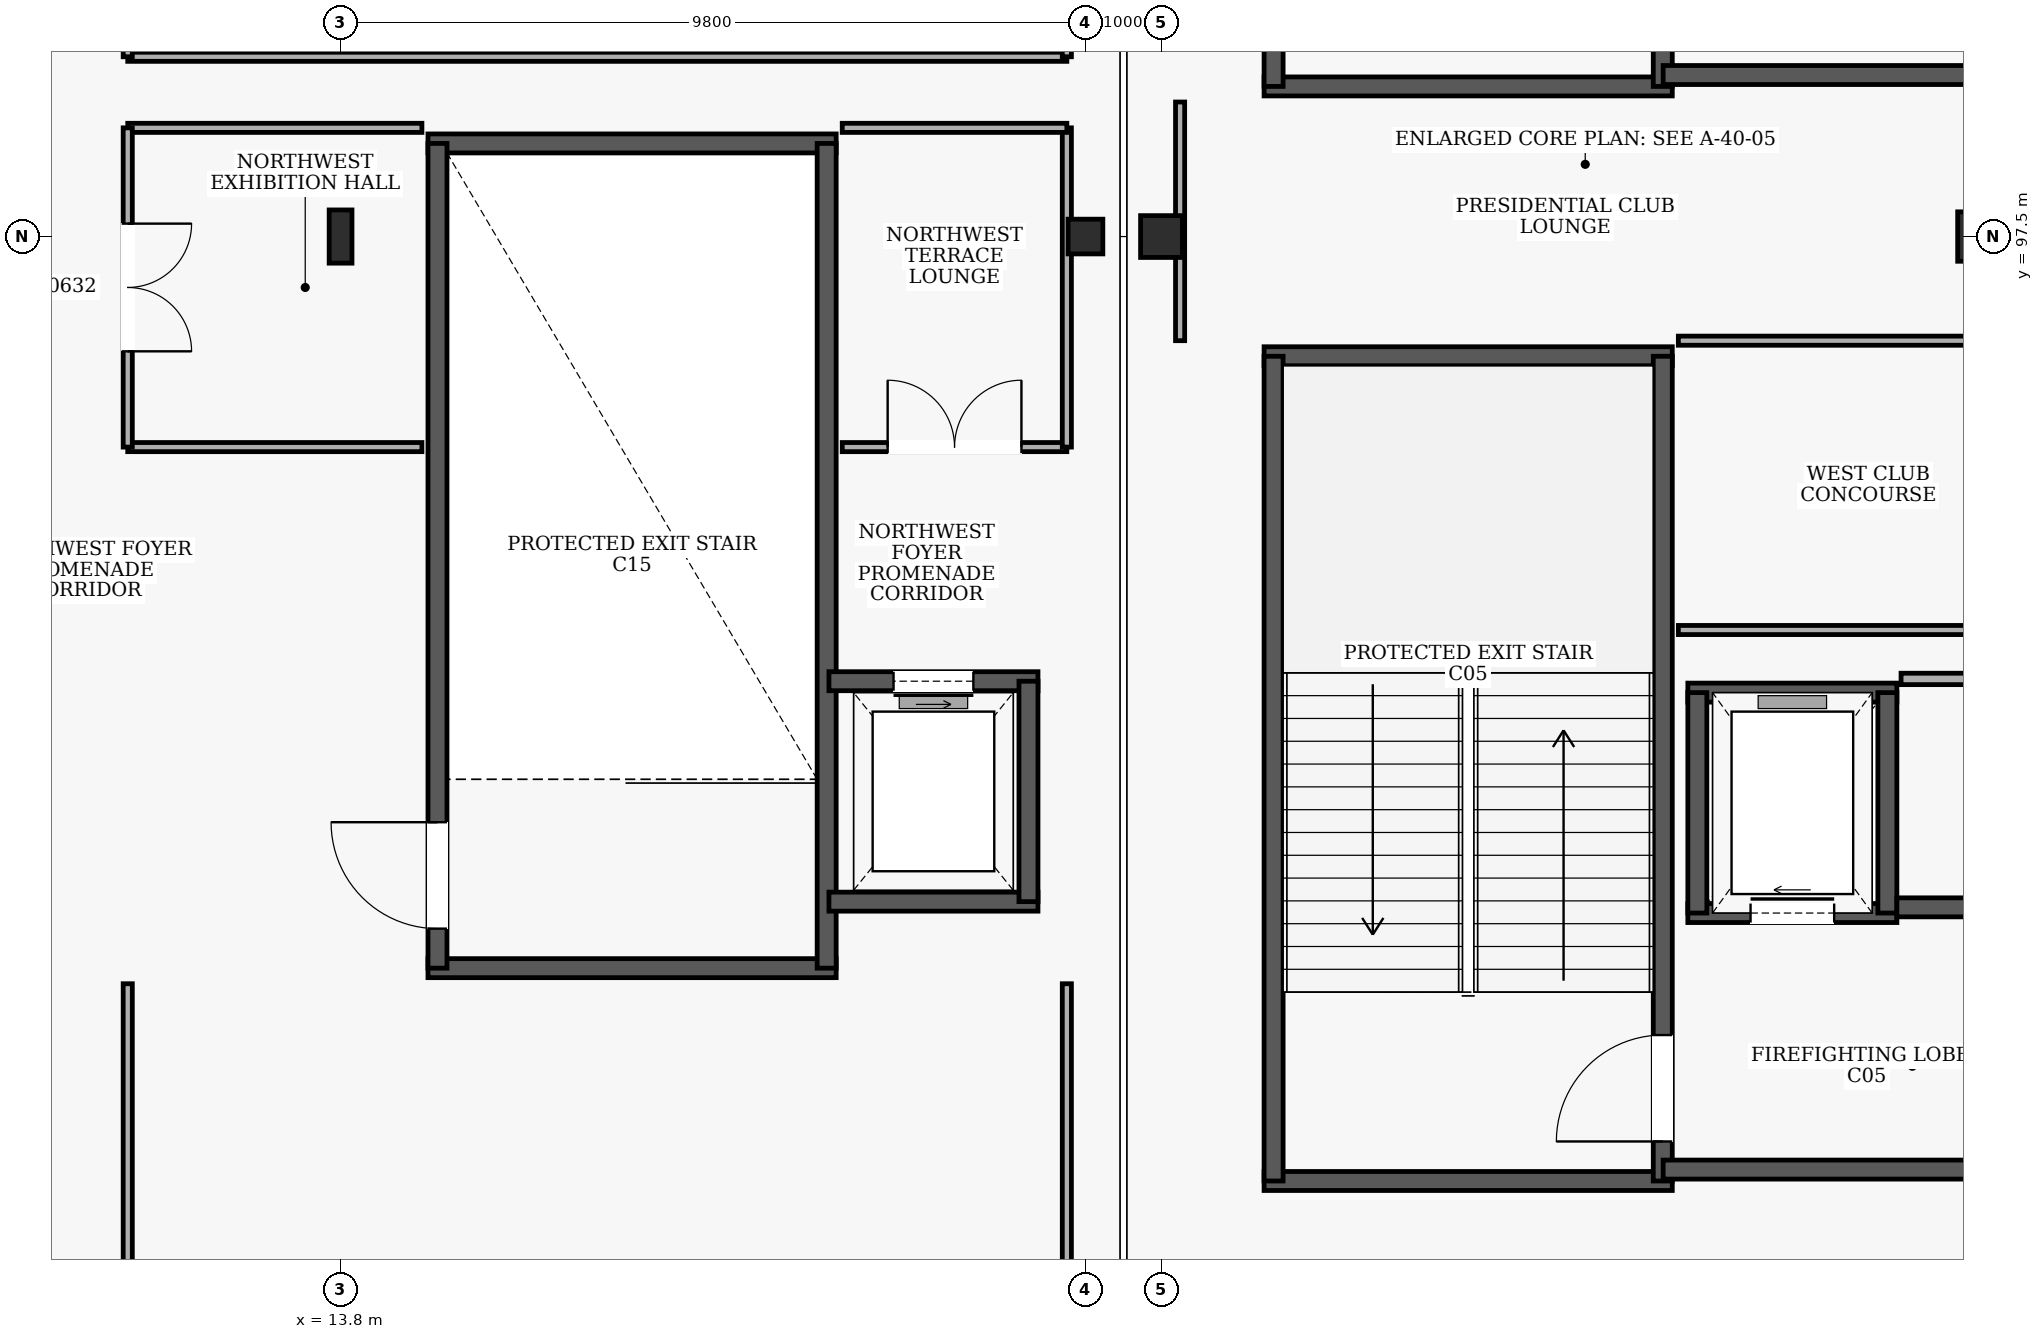
"""IFC4 building model, lengths in metres.
Left out: names, types, materials, properties, quantities, classifications, styles, units other than length and angle.
Written with IfcOpenShell. Run it as: python <this file> out.ifc"""

import sys

from ifc_helpers import new_model, si_unit, direction, frame, frame_2d, origin, origin_2d, place, context, subcontext, project, spatial, rectangle, hollow_circle, i_section, extrude, element, fill, save


model = new_model("IFC4")
c1 = context("Model", 3, precision=1e-05, world=origin(), true_north=direction((0.0, 1.0)))
c2 = subcontext(c1, "Body", "Model", "MODEL_VIEW")
j1 = project(units=[si_unit("LENGTHUNIT", "METRE"), si_unit("PLANEANGLEUNIT", "RADIAN")], contexts=[c1])
p1 = place(None, origin())
s1 = spatial("IfcSite", under=j1, at=p1, CompositionType="ELEMENT")
p2 = place(p1, origin())
s2 = spatial("IfcBuilding", under=s1, at=p2, CompositionType="ELEMENT")
p3 = place(p2, frame((0.0, 0.0, 10.2)))
s3 = spatial("IfcBuildingStorey", under=s2, at=p3, CompositionType="ELEMENT", Elevation=10.2)
p4 = place(p3, frame((13.8, 97.5, 0.0), z_axis=(0.0, 0.0, 1.0), x_axis=(1.0, 0.0, 0.0)))
e1 = element("IfcColumn", 1, at=p4, inside=s3, PredefinedType="COLUMN", context=c2, shape_type="SweptSolid", body=[
    extrude(i_section(OverallWidth=0.3, OverallDepth=0.7, WebThickness=0.017, FlangeThickness=0.032, at=origin_2d()), origin(), (0.0, 0.0, 1.0), 4.8),
])
p5 = place(p3, frame((23.6, 97.5, 0.0), z_axis=(0.0, 0.0, 1.0), x_axis=(1.0, 0.0, 0.0)))
e2 = element("IfcColumn", 2, at=p5, inside=s3, PredefinedType="COLUMN", context=c2, shape_type="SweptSolid", body=[
    extrude(hollow_circle(Radius=0.229, WallThickness=0.02, at=origin_2d()), origin(), (0.0, 0.0, 1.0), 4.8),
])
p6 = place(p3, frame((24.6, 97.5, 0.0), z_axis=(0.0, 0.0, 1.0), x_axis=(1.0, 0.0, 0.0)))
e3 = element("IfcColumn", 3, at=p6, inside=s3, PredefinedType="COLUMN", context=c2, shape_type="SweptSolid", body=[
    extrude(rectangle(XDim=0.55, YDim=0.55, at=origin_2d()), origin(), (0.0, 0.0, 1.0), 4.8),
])
p7 = place(p3, frame((35.4, 97.5, 0.0), z_axis=(0.0, 0.0, 1.0), x_axis=(1.0, 0.0, 0.0)))
e4 = element("IfcColumn", 4, at=p7, inside=s3, PredefinedType="COLUMN", context=c2, shape_type="SweptSolid", body=[
    extrude(rectangle(XDim=0.65, YDim=0.65, at=origin_2d()), origin(), (0.0, 0.0, 1.0), 4.8),
])
for number, where, z_axis, x_axis in (
    (5, (25.95, 85.075, 0.0), (0.0, 0.0, 1.0), (1.0, 0.0, 0.0)),
    (6, (31.32, 95.925, 0.0), (0.0, 0.0, 1.0), (-1.0, 0.0, 0.0)),
):
    element("IfcWall", number, at=place(p3, frame(where, z_axis=z_axis, x_axis=x_axis)), inside=s3, PredefinedType="SHEAR", context=c2, shape_type="SweptSolid", body=[
        extrude(rectangle(XDim=5.37, YDim=0.25, at=frame_2d((2.685, 0.0))), origin(), (0.0, 0.0, 1.0), 4.48),
    ])
p8 = place(p3, frame((26.075, 85.075, 0.0), z_axis=(0.0, 0.0, 1.0), x_axis=(0.0, 1.0, 0.0)))
e7 = element("IfcWall", 7, at=p8, inside=s3, PredefinedType="SHEAR", context=c2, shape_type="SweptSolid", body=[
    extrude(rectangle(XDim=10.85, YDim=0.25, at=frame_2d((5.425, 0.0))), origin(), (0.0, 0.0, 1.0), 4.48),
])
p9 = place(p3, frame((31.195, 85.075, 0.0), z_axis=(0.0, 0.0, 1.0), x_axis=(0.0, 1.0, 0.0)))
e8 = element("IfcWall", 8, at=p9, inside=s3, PredefinedType="SHEAR", context=c2, shape_type="SweptSolid", body=[
    extrude(rectangle(XDim=10.85, YDim=0.25, at=frame_2d((5.425, 0.0))), origin(), (0.0, 0.0, 1.0), 4.48),
])
p10 = place(p9, frame((0.52, 0.0, 0.0)))
e9 = element("IfcOpeningElement", 9, at=p10, cuts=e8, PredefinedType="OPENING", context=c2, shape_type="SweptSolid", body=[
    extrude(rectangle(XDim=1.4, YDim=2.15, at=frame_2d((0.7, 1.075))), frame((0.0, 0.135, 0.0), z_axis=(0.0, -1.0, 0.0), x_axis=(1.0, 0.0, 0.0)), (0.0, 0.0, 1.0), 0.27),
])
p11 = place(p3, frame((25.95, 99.475, 0.0), z_axis=(0.0, 0.0, 1.0), x_axis=(1.0, 0.0, 0.0)))
e10 = element("IfcWall", 10, at=p11, inside=s3, PredefinedType="SHEAR", context=c2, shape_type="SweptSolid", body=[
    extrude(rectangle(XDim=5.37, YDim=0.25, at=frame_2d((2.685, 0.0))), origin(), (0.0, 0.0, 1.0), 4.48),
])
p12 = place(p3, frame((26.075, 99.475, 0.0), z_axis=(0.0, 0.0, 1.0), x_axis=(0.0, 1.0, 0.0)))
e11 = element("IfcWall", 11, at=p12, inside=s3, PredefinedType="SHEAR", context=c2, shape_type="SweptSolid", body=[
    extrude(rectangle(XDim=10.85, YDim=0.25, at=frame_2d((5.425, 0.0))), origin(), (0.0, 0.0, 1.0), 4.48),
])
p13 = place(p3, frame((31.195, 99.475, 0.0), z_axis=(0.0, 0.0, 1.0), x_axis=(0.0, 1.0, 0.0)))
e12 = element("IfcWall", 12, at=p13, inside=s3, PredefinedType="SHEAR", context=c2, shape_type="SweptSolid", body=[
    extrude(rectangle(XDim=10.85, YDim=0.25, at=frame_2d((5.425, 0.0))), origin(), (0.0, 0.0, 1.0), 4.48),
])
p14 = place(p13, frame((0.52, 0.0, 0.0)))
e13 = element("IfcOpeningElement", 13, at=p14, cuts=e12, PredefinedType="OPENING", context=c2, shape_type="SweptSolid", body=[
    extrude(rectangle(XDim=1.4, YDim=2.15, at=frame_2d((0.7, 1.075))), frame((0.0, 0.135, 0.0), z_axis=(0.0, -1.0, 0.0), x_axis=(1.0, 0.0, 0.0)), (0.0, 0.0, 1.0), 0.27),
])
for number, where, z_axis, x_axis in (
    (14, (14.95, 87.875, 0.0), (0.0, 0.0, 1.0), (1.0, 0.0, 0.0)),
    (15, (20.32, 98.725, 0.0), (0.0, 0.0, 1.0), (-1.0, 0.0, 0.0)),
):
    element("IfcWall", number, at=place(p3, frame(where, z_axis=z_axis, x_axis=x_axis)), inside=s3, PredefinedType="SHEAR", context=c2, shape_type="SweptSolid", body=[
        extrude(rectangle(XDim=5.37, YDim=0.25, at=frame_2d((2.685, 0.0))), origin(), (0.0, 0.0, 1.0), 4.48),
    ])
p15 = place(p3, frame((15.075, 87.875, 0.0), z_axis=(0.0, 0.0, 1.0), x_axis=(0.0, 1.0, 0.0)))
e16 = element("IfcWall", 16, at=p15, inside=s3, PredefinedType="SHEAR", context=c2, shape_type="SweptSolid", body=[
    extrude(rectangle(XDim=10.85, YDim=0.25, at=frame_2d((5.425, 0.0))), origin(), (0.0, 0.0, 1.0), 4.48),
])
p16 = place(p15, frame((0.52, 0.0, 0.0)))
e17 = element("IfcOpeningElement", 17, at=p16, cuts=e16, PredefinedType="OPENING", context=c2, shape_type="SweptSolid", body=[
    extrude(rectangle(XDim=1.4, YDim=2.15, at=frame_2d((0.7, 1.075))), frame((0.0, 0.135, 0.0), z_axis=(0.0, -1.0, 0.0), x_axis=(1.0, 0.0, 0.0)), (0.0, 0.0, 1.0), 0.27),
])
p17 = place(p3, frame((20.195, 87.875, 0.0), z_axis=(0.0, 0.0, 1.0), x_axis=(0.0, 1.0, 0.0)))
e18 = element("IfcWall", 18, at=p17, inside=s3, PredefinedType="SHEAR", context=c2, shape_type="SweptSolid", body=[
    extrude(rectangle(XDim=10.85, YDim=0.25, at=frame_2d((5.425, 0.0))), origin(), (0.0, 0.0, 1.0), 4.48),
])
p18 = place(p3, frame((31.525, 88.6, 0.0), z_axis=(0.0, 0.0, 1.0), x_axis=(1.0, 0.0, 0.0)))
e19 = element("IfcWall", 19, at=p18, inside=s3, PredefinedType="SHEAR", context=c2, shape_type="SweptSolid", body=[
    extrude(rectangle(XDim=2.75, YDim=0.25, at=frame_2d((1.375, 0.0))), origin(), (0.0, 0.0, 1.0), 4.48),
])
p19 = place(p18, frame((0.825, 0.0, 0.0)))
e20 = element("IfcOpeningElement", 20, at=p19, cuts=e19, PredefinedType="OPENING", context=c2, shape_type="SweptSolid", body=[
    extrude(rectangle(XDim=1.1, YDim=2.15, at=frame_2d((0.55, 1.075))), frame((0.0, 0.135, 0.0), z_axis=(0.0, -1.0, 0.0), x_axis=(1.0, 0.0, 0.0)), (0.0, 0.0, 1.0), 0.27),
])
p20 = place(p3, frame((34.275, 91.5, 0.0), z_axis=(0.0, 0.0, 1.0), x_axis=(-1.0, 0.0, 0.0)))
e21 = element("IfcWall", 21, at=p20, inside=s3, PredefinedType="SHEAR", context=c2, shape_type="SweptSolid", body=[
    extrude(rectangle(XDim=2.75, YDim=0.25, at=frame_2d((1.375, 0.0))), origin(), (0.0, 0.0, 1.0), 4.48),
])
for number, where, z_axis, x_axis in (
    (22, (31.65, 91.5, 0.0), (0.0, 0.0, 1.0), (0.0, -1.0, 0.0)),
    (23, (34.15, 88.6, 0.0), (0.0, 0.0, 1.0), (0.0, 1.0, 0.0)),
):
    element("IfcWall", number, at=place(p3, frame(where, z_axis=z_axis, x_axis=x_axis)), inside=s3, PredefinedType="SHEAR", context=c2, shape_type="SweptSolid", body=[
        extrude(rectangle(XDim=2.9, YDim=0.25, at=frame_2d((1.45, 0.0))), origin(), (0.0, 0.0, 1.0), 4.48),
    ])
p21 = place(p3, frame((34.275, 88.675, 0.0), z_axis=(0.0, 0.0, 1.0), x_axis=(1.0, 0.0, 0.0)))
e24 = element("IfcWall", 24, at=p21, inside=s3, PredefinedType="SHEAR", context=c2, shape_type="SweptSolid", body=[
    extrude(rectangle(XDim=2.525, YDim=0.25, at=frame_2d((1.263, 0.0))), origin(), (0.0, 0.0, 1.0), 4.48),
])
for number, where, z_axis, x_axis in (
    (25, (31.2, 85.225, 0.0), (0.0, 0.0, 1.0), (1.0, 0.0, 0.0)),
    (26, (31.2, 99.625, 0.0), (0.0, 0.0, 1.0), (1.0, 0.0, 0.0)),
):
    element("IfcWall", number, at=place(p3, frame(where, z_axis=z_axis, x_axis=x_axis)), inside=s3, PredefinedType="SHEAR", context=c2, shape_type="SweptSolid", body=[
        extrude(rectangle(XDim=5.6, YDim=0.25, at=frame_2d((2.8, 0.0))), origin(), (0.0, 0.0, 1.0), 4.48),
    ])
p22 = place(p3, frame((20.225, 88.75, 0.0), z_axis=(0.0, 0.0, 1.0), x_axis=(1.0, 0.0, 0.0)))
e27 = element("IfcWall", 27, at=p22, inside=s3, PredefinedType="SHEAR", context=c2, shape_type="SweptSolid", body=[
    extrude(rectangle(XDim=2.75, YDim=0.25, at=frame_2d((1.375, 0.0))), origin(), (0.0, 0.0, 1.0), 4.48),
])
p23 = place(p3, frame((22.975, 91.65, 0.0), z_axis=(0.0, 0.0, 1.0), x_axis=(-1.0, 0.0, 0.0)))
e28 = element("IfcWall", 28, at=p23, inside=s3, PredefinedType="SHEAR", context=c2, shape_type="SweptSolid", body=[
    extrude(rectangle(XDim=2.75, YDim=0.25, at=frame_2d((1.375, 0.0))), origin(), (0.0, 0.0, 1.0), 4.48),
])
p24 = place(p23, frame((0.85, 0.0, 0.0)))
e29 = element("IfcOpeningElement", 29, at=p24, cuts=e28, PredefinedType="OPENING", context=c2, shape_type="SweptSolid", body=[
    extrude(rectangle(XDim=1.05, YDim=2.15, at=frame_2d((0.525, 1.075))), frame((0.0, 0.135, 0.0), z_axis=(0.0, -1.0, 0.0), x_axis=(1.0, 0.0, 0.0)), (0.0, 0.0, 1.0), 0.27),
])
p25 = place(p3, frame((22.85, 88.75, 0.0), z_axis=(0.0, 0.0, 1.0), x_axis=(0.0, 1.0, 0.0)))
e30 = element("IfcWall", 30, at=p25, inside=s3, PredefinedType="SHEAR", context=c2, shape_type="SweptSolid", body=[
    extrude(rectangle(XDim=2.9, YDim=0.25, at=frame_2d((1.45, 0.0))), origin(), (0.0, 0.0, 1.0), 4.48),
])
p26 = place(p3, frame((37.2, 91.68, 0.0), z_axis=(0.0, 0.0, 1.0), x_axis=(-1.0, 0.0, 0.0)))
e31 = element("IfcWall", 31, at=p26, inside=s3, PredefinedType="PARTITIONING", context=c2, shape_type="SweptSolid", body=[
    extrude(rectangle(XDim=2.87, YDim=0.15, at=frame_2d((1.435, 0.0))), origin(), (0.0, 0.0, 1.0), 4.48),
])
p27 = place(p3, frame((24.845, 99.27, 0.0), z_axis=(0.0, 0.0, 1.0), x_axis=(0.0, -1.0, 0.0)))
e32 = element("IfcWall", 32, at=p27, inside=s3, PredefinedType="PARTITIONING", context=c2, shape_type="SweptSolid", body=[
    extrude(rectangle(XDim=3.14, YDim=0.12, at=frame_2d((1.57, 0.0))), origin(), (0.0, 0.0, 1.0), 3.56),
])
for number, where, z_axis, x_axis in (
    (33, (31.4, 92.323, 0.0), (0.0, 0.0, 1.0), (1.0, 0.0, 0.0)),
    (34, (37.2, 96.13, 0.0), (0.0, 0.0, 1.0), (-1.0, 0.0, 0.0)),
):
    element("IfcWall", number, at=place(p3, frame(where, z_axis=z_axis, x_axis=x_axis)), inside=s3, PredefinedType="PARTITIONING", context=c2, shape_type="SweptSolid", body=[
        extrude(rectangle(XDim=5.8, YDim=0.12, at=frame_2d((2.9, 0.0))), origin(), (0.0, 0.0, 1.0), 4.48),
    ])
p28 = place(p3, frame((23.355, 76.895, 0.0), z_axis=(0.0, 0.0, 1.0), x_axis=(0.0, 1.0, 0.0)))
e35 = element("IfcWall", 35, at=p28, inside=s3, PredefinedType="PARTITIONING", context=c2, shape_type="SweptSolid", body=[
    extrude(rectangle(XDim=10.775, YDim=0.12, at=frame_2d((5.387, 0.0))), origin(), (0.0, 0.0, 1.0), 3.82),
])
p29 = place(p3, frame((11.0, 87.67, 0.0), z_axis=(0.0, 0.0, 1.0), x_axis=(0.0, -1.0, 0.0)))
e36 = element("IfcWall", 36, at=p29, inside=s3, PredefinedType="PARTITIONING", context=c2, shape_type="SweptSolid", body=[
    extrude(rectangle(XDim=10.775, YDim=0.12, at=frame_2d((5.387, 0.0))), origin(), (0.0, 0.0, 1.0), 4.48),
])
p30 = place(p29, frame((4.613, 0.0, 0.0)))
e37 = element("IfcOpeningElement", 37, at=p30, cuts=e36, PredefinedType="OPENING", context=c2, shape_type="SweptSolid", body=[
    extrude(rectangle(XDim=1.55, YDim=2.2, at=frame_2d((0.775, 1.1))), frame((0.0, 0.07, 0.0), z_axis=(0.0, -1.0, 0.0), x_axis=(1.0, 0.0, 0.0)), (0.0, 0.0, 1.0), 0.14),
])
for number, where, z_axis, x_axis in (
    (38, (11.0, 94.73, 0.0), (0.0, 0.0, 1.0), (1.0, 0.0, 0.0)),
    (39, (14.87, 98.93, 0.0), (0.0, 0.0, 1.0), (-1.0, 0.0, 0.0)),
):
    element("IfcWall", number, at=place(p3, frame(where, z_axis=z_axis, x_axis=x_axis)), inside=s3, PredefinedType="PARTITIONING", context=c2, shape_type="SweptSolid", body=[
        extrude(rectangle(XDim=3.87, YDim=0.12, at=frame_2d((1.935, 0.0))), origin(), (0.0, 0.0, 1.0), 4.48),
    ])
p31 = place(p3, frame((11.0, 98.93, 0.0), z_axis=(0.0, 0.0, 1.0), x_axis=(0.0, -1.0, 0.0)))
e40 = element("IfcWall", 40, at=p31, inside=s3, PredefinedType="PARTITIONING", context=c2, shape_type="SweptSolid", body=[
    extrude(rectangle(XDim=4.2, YDim=0.12, at=frame_2d((2.1, 0.0))), origin(), (0.0, 0.0, 1.0), 4.48),
])
p32 = place(p31, frame((1.26, 0.0, 0.0)))
e41 = element("IfcOpeningElement", 41, at=p32, cuts=e40, PredefinedType="OPENING", context=c2, shape_type="SweptSolid", body=[
    extrude(rectangle(XDim=1.68, YDim=2.25, at=frame_2d((0.84, 1.125))), frame((0.0, 0.07, 0.0), z_axis=(0.0, -1.0, 0.0), x_axis=(1.0, 0.0, 0.0)), (0.0, 0.0, 1.0), 0.14),
])
p33 = place(p3, frame((20.4, 94.73, 0.0), z_axis=(0.0, 0.0, 1.0), x_axis=(1.0, 0.0, 0.0)))
e42 = element("IfcWall", 42, at=p33, inside=s3, PredefinedType="PARTITIONING", context=c2, shape_type="SweptSolid", body=[
    extrude(rectangle(XDim=2.955, YDim=0.12, at=frame_2d((1.478, 0.0))), origin(), (0.0, 0.0, 1.0), 4.48),
])
p34 = place(p33, frame((0.597, 0.0, 0.0)))
e43 = element("IfcOpeningElement", 43, at=p34, cuts=e42, PredefinedType="OPENING", context=c2, shape_type="SweptSolid", body=[
    extrude(rectangle(XDim=1.76, YDim=2.25, at=frame_2d((0.88, 1.125))), frame((0.0, 0.07, 0.0), z_axis=(0.0, -1.0, 0.0), x_axis=(1.0, 0.0, 0.0)), (0.0, 0.0, 1.0), 0.14),
])
p35 = place(p3, frame((23.355, 94.73, 0.0), z_axis=(0.0, 0.0, 1.0), x_axis=(0.0, 1.0, 0.0)))
e44 = element("IfcWall", 44, at=p35, inside=s3, PredefinedType="PARTITIONING", context=c2, shape_type="SweptSolid", body=[
    extrude(rectangle(XDim=4.2, YDim=0.12, at=frame_2d((2.1, 0.0))), origin(), (0.0, 0.0, 1.0), 3.72),
])
p36 = place(p3, frame((23.355, 98.93, 0.0), z_axis=(0.0, 0.0, 1.0), x_axis=(-1.0, 0.0, 0.0)))
e45 = element("IfcWall", 45, at=p36, inside=s3, PredefinedType="PARTITIONING", context=c2, shape_type="SweptSolid", body=[
    extrude(rectangle(XDim=2.955, YDim=0.12, at=frame_2d((1.478, 0.0))), origin(), (0.0, 0.0, 1.0), 4.48),
])
p37 = place(p3, frame((11.0, 99.865, 0.0), z_axis=(0.0, 0.0, 1.0), x_axis=(1.0, 0.0, 0.0)))
e46 = element("IfcWall", 46, at=p37, inside=s3, PredefinedType="PARTITIONING", context=c2, shape_type="SweptSolid", body=[
    extrude(rectangle(XDim=12.355, YDim=0.12, at=frame_2d((6.177, 0.0))), origin(), (0.0, 0.0, 1.0), 4.48),
])
p38 = place(p3, frame((23.355, 99.865, 0.0), z_axis=(0.0, 0.0, 1.0), x_axis=(0.0, 1.0, 0.0)))
e47 = element("IfcWall", 47, at=p38, inside=s3, PredefinedType="PARTITIONING", context=c2, shape_type="SweptSolid", body=[
    extrude(rectangle(XDim=11.185, YDim=0.12, at=frame_2d((5.593, 0.0))), origin(), (0.0, 0.0, 1.0), 3.72),
])
p39 = place(p3, frame((11.0, 111.05, 0.0), z_axis=(0.0, 0.0, 1.0), x_axis=(0.0, -1.0, 0.0)))
e48 = element("IfcWall", 48, at=p39, inside=s3, PredefinedType="PARTITIONING", context=c2, shape_type="SweptSolid", body=[
    extrude(rectangle(XDim=11.185, YDim=0.12, at=frame_2d((5.593, 0.0))), origin(), (0.0, 0.0, 1.0), 4.48),
])
p40 = place(p39, frame((4.663, 0.0, 0.0)))
e49 = element("IfcOpeningElement", 49, at=p40, cuts=e48, PredefinedType="OPENING", context=c2, shape_type="SweptSolid", body=[
    extrude(rectangle(XDim=1.86, YDim=2.3, at=frame_2d((0.93, 1.15))), frame((0.0, 0.07, 0.0), z_axis=(0.0, -1.0, 0.0), x_axis=(1.0, 0.0, 0.0)), (0.0, 0.0, 1.0), 0.14),
])
p41 = place(p10, origin())
e50 = element("IfcDoor", 50, at=p41, inside=s3, OperationType="SINGLE_SWING_LEFT", PredefinedType="DOOR", context=c2, shape_type="SweptSolid", body=[
    extrude(rectangle(XDim=1.4, YDim=2.15, at=frame_2d((0.7, 1.075))), frame((0.0, 0.025, 0.0), z_axis=(0.0, -1.0, 0.0), x_axis=(1.0, 0.0, 0.0)), (0.0, 0.0, 1.0), 0.05),
])
fill(e9, e50)
p42 = place(p16, frame((1.4, 0.0, 0.0), z_axis=(0.0, 0.0, 1.0), x_axis=(-1.0, 0.0, 0.0)))
e51 = element("IfcDoor", 51, at=p42, inside=s3, OperationType="SINGLE_SWING_LEFT", PredefinedType="DOOR", context=c2, shape_type="SweptSolid", body=[
    extrude(rectangle(XDim=1.4, YDim=2.15, at=frame_2d((0.7, 1.075))), frame((0.0, 0.025, 0.0), z_axis=(0.0, -1.0, 0.0), x_axis=(1.0, 0.0, 0.0)), (0.0, 0.0, 1.0), 0.05),
])
fill(e17, e51)
p43 = place(p19, origin())
e52 = element("IfcDoor", 52, at=p43, inside=s3, OperationType="SLIDING_TO_RIGHT", PredefinedType="DOOR", context=c2, shape_type="SweptSolid", body=[
    extrude(rectangle(XDim=1.1, YDim=2.15, at=frame_2d((0.55, 1.075))), frame((0.0, 0.025, 0.0), z_axis=(0.0, -1.0, 0.0), x_axis=(1.0, 0.0, 0.0)), (0.0, 0.0, 1.0), 0.05),
])
fill(e20, e52)
p44 = place(p24, origin())
e53 = element("IfcDoor", 53, at=p44, inside=s3, OperationType="SLIDING_TO_RIGHT", PredefinedType="DOOR", context=c2, shape_type="SweptSolid", body=[
    extrude(rectangle(XDim=1.05, YDim=2.15, at=frame_2d((0.525, 1.075))), frame((0.0, 0.025, 0.0), z_axis=(0.0, -1.0, 0.0), x_axis=(1.0, 0.0, 0.0)), (0.0, 0.0, 1.0), 0.05),
])
fill(e29, e53)
p45 = place(p32, origin())
e54 = element("IfcDoor", 54, at=p45, inside=s3, OperationType="DOUBLE_DOOR_SINGLE_SWING", PredefinedType="DOOR", context=c2, shape_type="SweptSolid", body=[
    extrude(rectangle(XDim=1.68, YDim=2.25, at=frame_2d((0.84, 1.125))), frame((0.0, 0.025, 0.0), z_axis=(0.0, -1.0, 0.0), x_axis=(1.0, 0.0, 0.0)), (0.0, 0.0, 1.0), 0.05),
])
fill(e41, e54)
p46 = place(p34, origin())
e55 = element("IfcDoor", 55, at=p46, inside=s3, OperationType="DOUBLE_DOOR_SINGLE_SWING", PredefinedType="DOOR", context=c2, shape_type="SweptSolid", body=[
    extrude(rectangle(XDim=1.76, YDim=2.25, at=frame_2d((0.88, 1.125))), frame((0.0, 0.025, 0.0), z_axis=(0.0, -1.0, 0.0), x_axis=(1.0, 0.0, 0.0)), (0.0, 0.0, 1.0), 0.05),
])
fill(e43, e55)
save(model, sys.argv[1])
